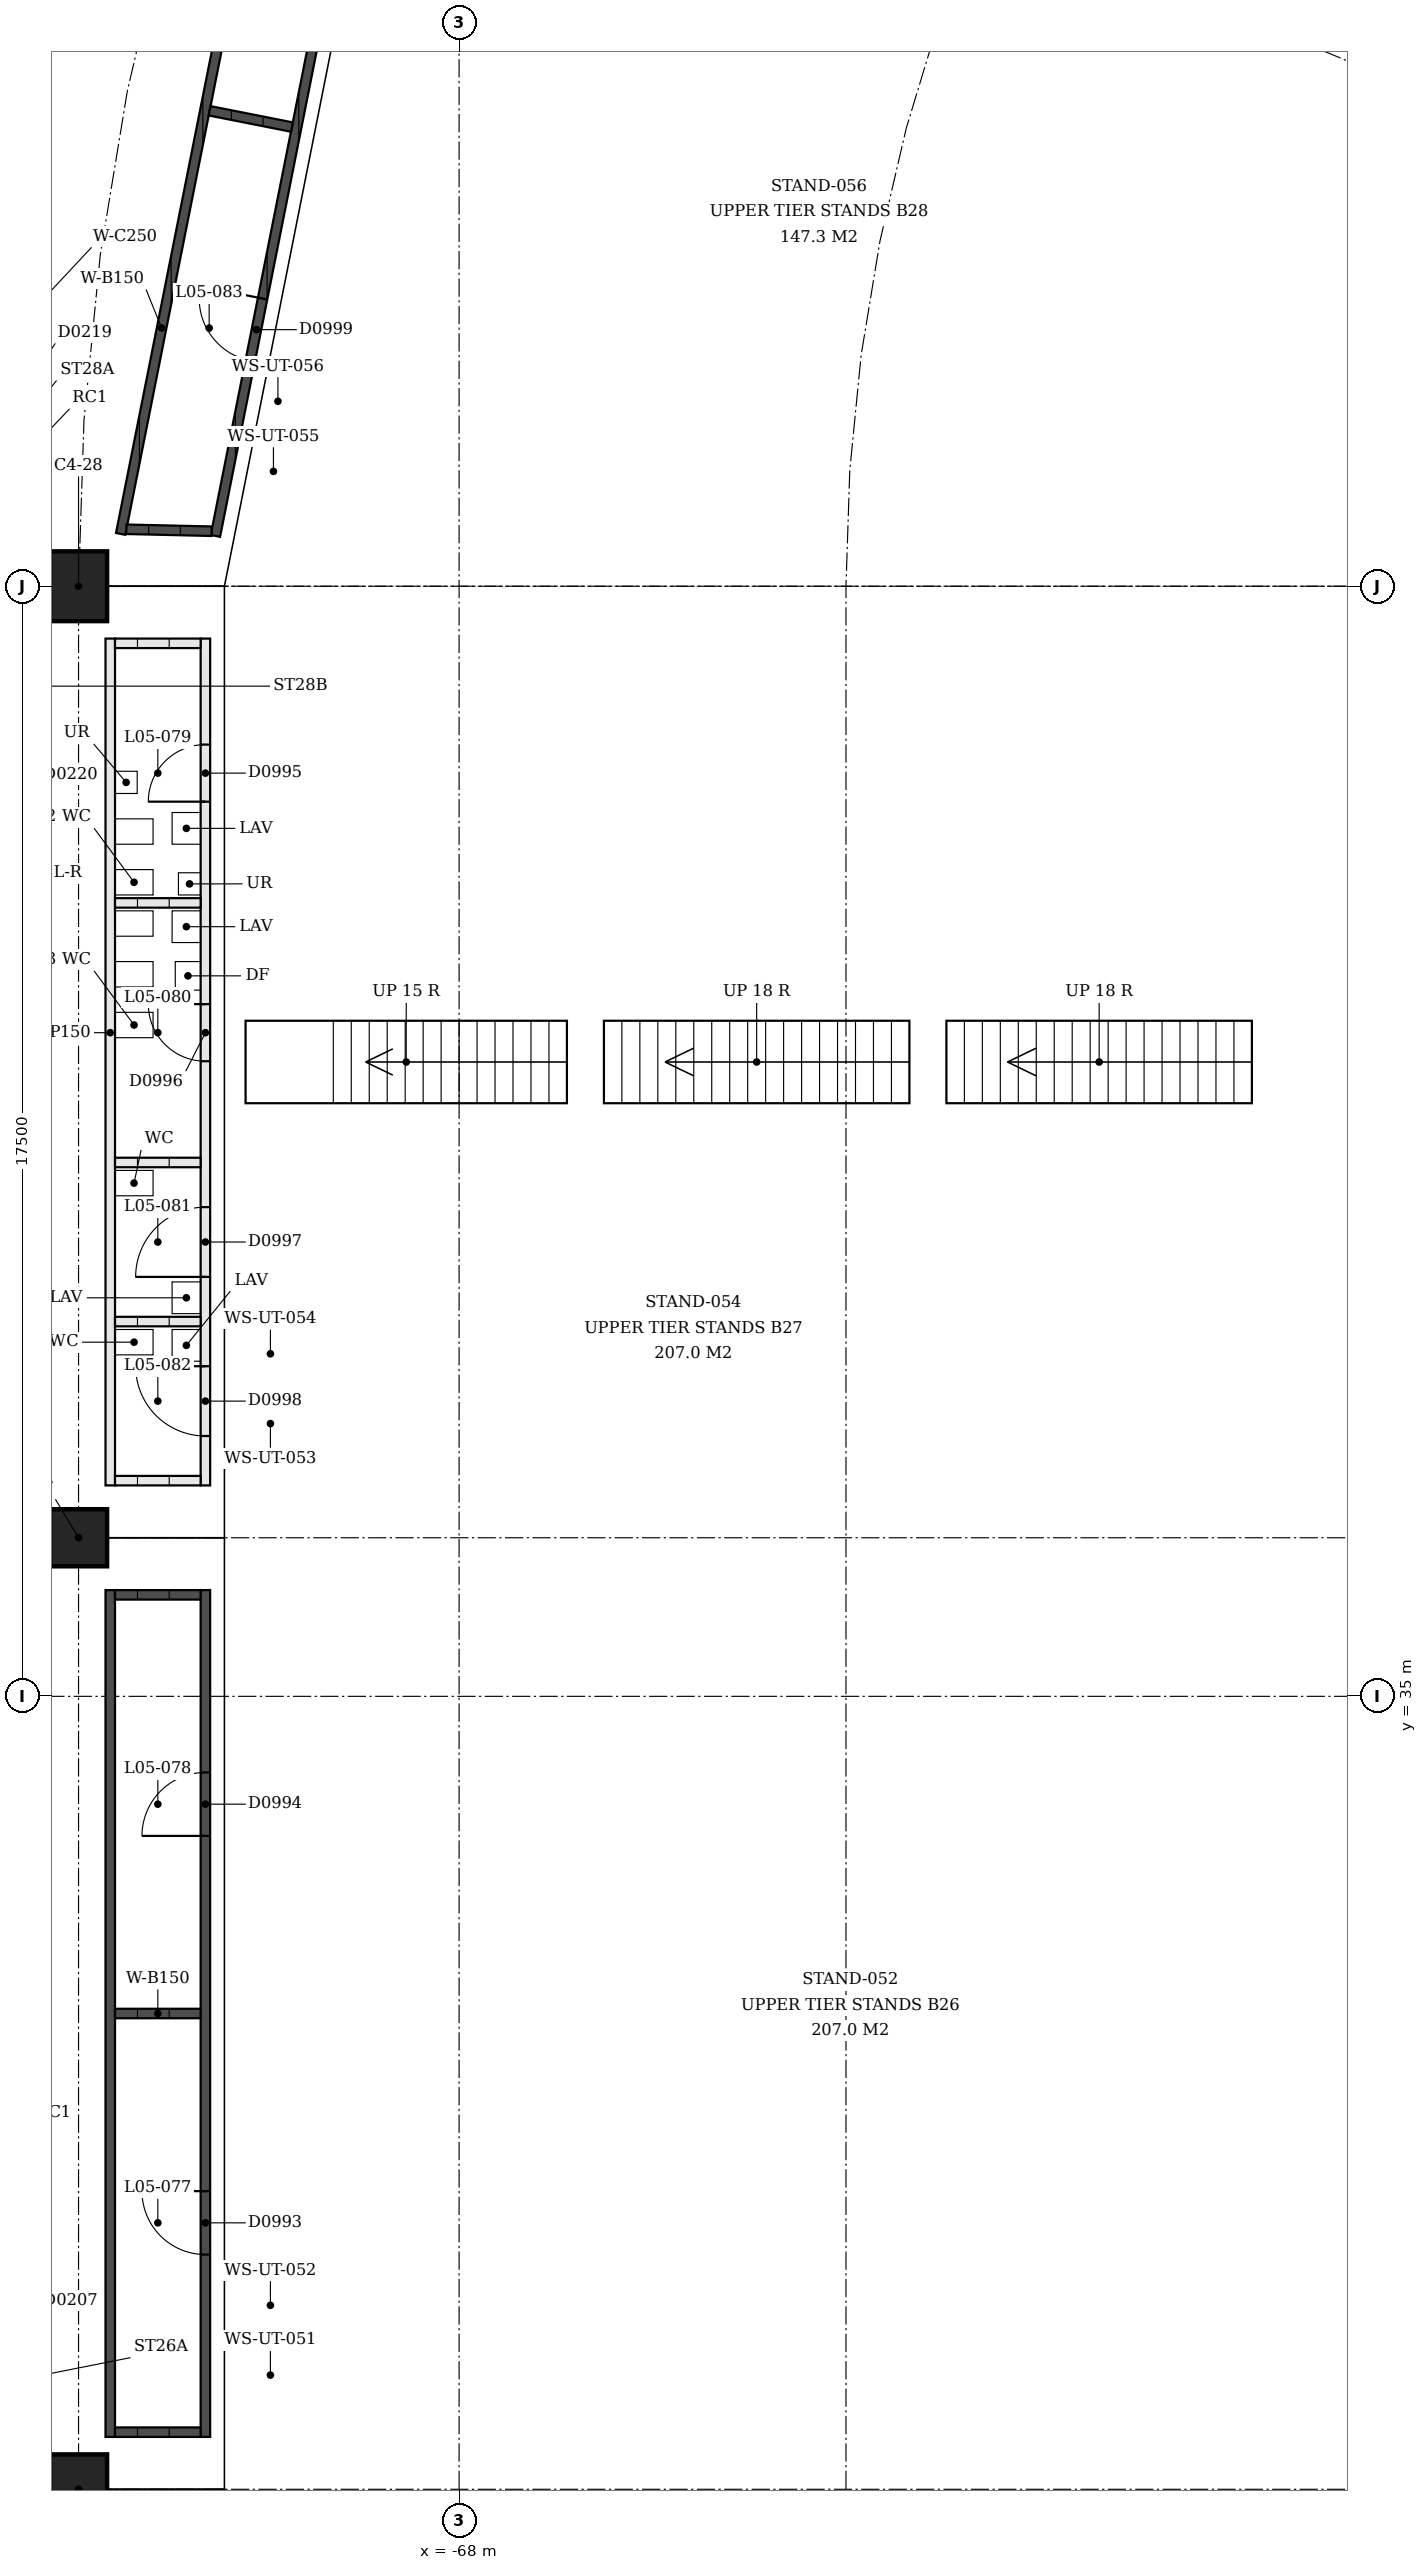
"""IFC4 building model, lengths in metres.
Left out: names, types, materials, properties, quantities, classifications, styles, units other than length and angle.
Written with IfcOpenShell. Run it as: python <this file> out.ifc"""

import sys

from ifc_helpers import new_model, si_unit, direction, frame, frame_2d, origin, origin_2d, place, context, subcontext, project, spatial, rectangle, extrude, element, fill, save


model = new_model("IFC4")
c1 = context("Model", 3, precision=1e-05, world=origin(), true_north=direction((0.0, 1.0)))
c2 = subcontext(c1, "Body", "Model", "MODEL_VIEW")
j1 = project(units=[si_unit("LENGTHUNIT", "METRE"), si_unit("PLANEANGLEUNIT", "RADIAN")], contexts=[c1])
p1 = place(None, origin())
s1 = spatial("IfcSite", under=j1, at=p1, CompositionType="ELEMENT")
p2 = place(p1, origin())
s2 = spatial("IfcBuilding", under=s1, at=p2, CompositionType="ELEMENT")
p3 = place(p2, frame((0.0, 0.0, 22.5)))
s3 = spatial("IfcBuildingStorey", under=s2, at=p3, CompositionType="ELEMENT", Elevation=22.5)
p4 = place(p3, frame((-74.0, 22.5, 0.0), z_axis=(0.0, 0.0, 1.0), x_axis=(0.0, -1.0, 0.0)))
e1 = element("IfcColumn", 1, at=p4, inside=s3, PredefinedType="COLUMN", context=c2, shape_type="SweptSolid", body=[
    extrude(rectangle(XDim=1.1, YDim=0.9, at=origin_2d()), origin(), (0.0, 0.0, 1.0), 6.5),
])
p5 = place(p3, frame((-74.0, 37.5, 0.0), z_axis=(0.0, 0.0, 1.0), x_axis=(0.0, -1.0, 0.0)))
e2 = element("IfcColumn", 2, at=p5, inside=s3, PredefinedType="COLUMN", context=c2, shape_type="SweptSolid", body=[
    extrude(rectangle(XDim=0.9, YDim=0.9, at=origin_2d()), origin(), (0.0, 0.0, 1.0), 6.5),
])
p6 = place(p3, frame((-74.0, 52.5, 0.0), z_axis=(0.0, 0.0, 1.0), x_axis=(0.0, -1.0, 0.0)))
e3 = element("IfcColumn", 3, at=p6, inside=s3, PredefinedType="COLUMN", context=c2, shape_type="SweptSolid", body=[
    extrude(rectangle(XDim=1.1, YDim=0.9, at=origin_2d()), origin(), (0.0, 0.0, 1.0), 6.5),
])
p7 = place(p3, frame((-72.0, 23.325, 0.0), z_axis=(0.0, 0.0, 1.0), x_axis=(0.0, 1.0, 0.0)))
e4 = element("IfcWall", 4, at=p7, inside=s3, PredefinedType="SOLIDWALL", context=c2, shape_type="SweptSolid", body=[
    extrude(rectangle(XDim=13.35, YDim=0.15, at=frame_2d((6.675, 0.0))), origin(), (0.0, 0.0, 1.0), 3.0),
])
p8 = place(p7, frame((2.875, 0.0, 0.0)))
e5 = element("IfcOpeningElement", 5, at=p8, cuts=e4, PredefinedType="OPENING", context=c2, shape_type="SweptSolid", body=[
    extrude(rectangle(XDim=1.0, YDim=2.1, at=frame_2d((0.5, 1.05))), frame((0.0, 0.075, 0.0), z_axis=(0.0, -1.0, 0.0), x_axis=(1.0, 0.0, 0.0)), (0.0, 0.0, 1.0), 0.15),
])
p9 = place(p7, frame((9.475, 0.0, 0.0)))
e6 = element("IfcOpeningElement", 6, at=p9, cuts=e4, PredefinedType="OPENING", context=c2, shape_type="SweptSolid", body=[
    extrude(rectangle(XDim=1.0, YDim=2.1, at=frame_2d((0.5, 1.05))), frame((0.0, 0.075, 0.0), z_axis=(0.0, -1.0, 0.0), x_axis=(1.0, 0.0, 0.0)), (0.0, 0.0, 1.0), 0.15),
])
p10 = place(p3, frame((-73.5, 23.325, 0.0), z_axis=(0.0, 0.0, 1.0), x_axis=(0.0, 1.0, 0.0)))
e7 = element("IfcWall", 7, at=p10, inside=s3, PredefinedType="SOLIDWALL", context=c2, shape_type="SweptSolid", body=[
    extrude(rectangle(XDim=13.35, YDim=0.15, at=frame_2d((6.675, 0.0))), origin(), (0.0, 0.0, 1.0), 3.0),
])
for number, where, z_axis, x_axis in (
    (8, (-72.075, 23.4, 0.0), (0.0, 0.0, 1.0), (-1.0, 0.0, 0.0)),
    (9, (-72.075, 30.0, 0.0), (0.0, 0.0, 1.0), (-1.0, 0.0, 0.0)),
    (10, (-72.075, 36.6, 0.0), (0.0, 0.0, 1.0), (-1.0, 0.0, 0.0)),
):
    element("IfcWall", number, at=place(p3, frame(where, z_axis=z_axis, x_axis=x_axis)), inside=s3, PredefinedType="SOLIDWALL", context=c2, shape_type="SweptSolid", body=[
        extrude(rectangle(XDim=1.35, YDim=0.15, at=frame_2d((0.675, 0.0))), origin(), (0.0, 0.0, 1.0), 3.0),
    ])
p11 = place(p3, frame((-72.0, 51.675, 0.0), z_axis=(0.0, 0.0, 1.0), x_axis=(0.0, -1.0, 0.0)))
e11 = element("IfcWall", 11, at=p11, inside=s3, PredefinedType="PARTITIONING", context=c2, shape_type="SweptSolid", body=[
    extrude(rectangle(XDim=13.35, YDim=0.15, at=frame_2d((6.675, 0.0))), origin(), (0.0, 0.0, 1.0), 3.0),
])
p12 = place(p11, frame((1.671, 0.0, 0.0)))
e12 = element("IfcOpeningElement", 12, at=p12, cuts=e11, PredefinedType="OPENING", context=c2, shape_type="SweptSolid", body=[
    extrude(rectangle(XDim=0.9, YDim=2.1, at=frame_2d((0.45, 1.05))), frame((0.0, 0.075, 0.0), z_axis=(0.0, -1.0, 0.0), x_axis=(1.0, 0.0, 0.0)), (0.0, 0.0, 1.0), 0.15),
])
p13 = place(p11, frame((5.763, 0.0, 0.0)))
e13 = element("IfcOpeningElement", 13, at=p13, cuts=e11, PredefinedType="OPENING", context=c2, shape_type="SweptSolid", body=[
    extrude(rectangle(XDim=0.9, YDim=2.1, at=frame_2d((0.45, 1.05))), frame((0.0, 0.075, 0.0), z_axis=(0.0, -1.0, 0.0), x_axis=(1.0, 0.0, 0.0)), (0.0, 0.0, 1.0), 0.15),
])
p14 = place(p11, frame((8.963, 0.0, 0.0)))
e14 = element("IfcOpeningElement", 14, at=p14, cuts=e11, PredefinedType="OPENING", context=c2, shape_type="SweptSolid", body=[
    extrude(rectangle(XDim=1.1, YDim=2.1, at=frame_2d((0.55, 1.05))), frame((0.0, 0.075, 0.0), z_axis=(0.0, -1.0, 0.0), x_axis=(1.0, 0.0, 0.0)), (0.0, 0.0, 1.0), 0.15),
])
p15 = place(p11, frame((11.471, 0.0, 0.0)))
e15 = element("IfcOpeningElement", 15, at=p15, cuts=e11, PredefinedType="OPENING", context=c2, shape_type="SweptSolid", body=[
    extrude(rectangle(XDim=1.1, YDim=2.1, at=frame_2d((0.55, 1.05))), frame((0.0, 0.075, 0.0), z_axis=(0.0, -1.0, 0.0), x_axis=(1.0, 0.0, 0.0)), (0.0, 0.0, 1.0), 0.15),
])
p16 = place(p3, frame((-73.5, 51.675, 0.0), z_axis=(0.0, 0.0, 1.0), x_axis=(0.0, -1.0, 0.0)))
e16 = element("IfcWall", 16, at=p16, inside=s3, PredefinedType="PARTITIONING", context=c2, shape_type="SweptSolid", body=[
    extrude(rectangle(XDim=13.35, YDim=0.15, at=frame_2d((6.675, 0.0))), origin(), (0.0, 0.0, 1.0), 3.0),
])
for number, where, z_axis, x_axis in (
    (17, (-72.075, 51.6, 0.0), (0.0, 0.0, 1.0), (-1.0, 0.0, 0.0)),
    (18, (-72.075, 47.508, 0.0), (0.0, 0.0, 1.0), (-1.0, 0.0, 0.0)),
    (19, (-72.075, 43.416, 0.0), (0.0, 0.0, 1.0), (-1.0, 0.0, 0.0)),
    (20, (-72.075, 40.908, 0.0), (0.0, 0.0, 1.0), (-1.0, 0.0, 0.0)),
    (21, (-72.075, 38.4, 0.0), (0.0, 0.0, 1.0), (-1.0, 0.0, 0.0)),
):
    element("IfcWall", number, at=place(p3, frame(where, z_axis=z_axis, x_axis=x_axis)), inside=s3, PredefinedType="PARTITIONING", context=c2, shape_type="SweptSolid", body=[
        extrude(rectangle(XDim=1.35, YDim=0.15, at=frame_2d((0.675, 0.0))), origin(), (0.0, 0.0, 1.0), 3.0),
    ])
p17 = place(p3, frame((-71.842, 53.293, 0.0), z_axis=(0.0, 0.0, 1.0), x_axis=(0.195095631841, 0.980784224198, 0.0)))
e22 = element("IfcWall", 22, at=p17, inside=s3, PredefinedType="SOLIDWALL", context=c2, shape_type="SweptSolid", body=[
    extrude(rectangle(XDim=13.113, YDim=0.15, at=frame_2d((6.557, 0.0))), origin(), (0.0, 0.0, 1.0), 3.0),
])
p18 = place(p17, frame((2.815, 0.0, 0.0)))
e23 = element("IfcOpeningElement", 23, at=p18, cuts=e22, PredefinedType="OPENING", context=c2, shape_type="SweptSolid", body=[
    extrude(rectangle(XDim=1.0, YDim=2.1, at=frame_2d((0.5, 1.05))), frame((0.0, 0.075, 0.0), z_axis=(0.0, -1.0, 0.0), x_axis=(1.0, 0.0, 0.0)), (0.0, 0.0, 1.0), 0.15),
])
p19 = place(p17, frame((9.298, 0.0, 0.0)))
e24 = element("IfcOpeningElement", 24, at=p19, cuts=e22, PredefinedType="OPENING", context=c2, shape_type="SweptSolid", body=[
    extrude(rectangle(XDim=1.0, YDim=2.1, at=frame_2d((0.5, 1.05))), frame((0.0, 0.075, 0.0), z_axis=(0.0, -1.0, 0.0), x_axis=(1.0, 0.0, 0.0)), (0.0, 0.0, 1.0), 0.15),
])
p20 = place(p3, frame((-73.336, 53.325, 0.0), z_axis=(0.0, 0.0, 1.0), x_axis=(0.195086146928, 0.980786110871, 0.0)))
e25 = element("IfcWall", 25, at=p20, inside=s3, PredefinedType="SOLIDWALL", context=c2, shape_type="SweptSolid", body=[
    extrude(rectangle(XDim=13.631, YDim=0.15, at=frame_2d((6.815, 0.0))), origin(), (0.0, 0.0, 1.0), 3.0),
])
p21 = place(p3, frame((-71.903, 53.367, 0.0), z_axis=(0.0, 0.0, 1.0), x_axis=(-0.999738070999, 0.022886445666, 0.0)))
e26 = element("IfcWall", 26, at=p21, inside=s3, PredefinedType="SOLIDWALL", context=c2, shape_type="SweptSolid", body=[
    extrude(rectangle(XDim=1.344, YDim=0.15, at=frame_2d((0.672, 0.0))), origin(), (0.0, 0.0, 1.0), 3.0),
])
p22 = place(p3, frame((-70.635, 59.738, 0.0), z_axis=(0.0, 0.0, 1.0), x_axis=(-0.981038980953, 0.193810520485, 0.0)))
e27 = element("IfcWall", 27, at=p22, inside=s3, PredefinedType="SOLIDWALL", context=c2, shape_type="SweptSolid", body=[
    extrude(rectangle(XDim=1.324, YDim=0.15, at=frame_2d((0.662, 0.0))), origin(), (0.0, 0.0, 1.0), 3.0),
])
p23 = place(p8, origin())
e28 = element("IfcDoor", 28, at=p23, inside=s3, OperationType="SINGLE_SWING_LEFT", PredefinedType="DOOR", context=c2, shape_type="SweptSolid", body=[
    extrude(rectangle(XDim=1.0, YDim=2.1, at=frame_2d((0.5, 1.05))), frame((0.0, 0.025, 0.0), z_axis=(0.0, -1.0, 0.0), x_axis=(1.0, 0.0, 0.0)), (0.0, 0.0, 1.0), 0.05),
])
fill(e5, e28)
p24 = place(p9, origin())
e29 = element("IfcDoor", 29, at=p24, inside=s3, OperationType="SINGLE_SWING_RIGHT", PredefinedType="DOOR", context=c2, shape_type="SweptSolid", body=[
    extrude(rectangle(XDim=1.0, YDim=2.1, at=frame_2d((0.5, 1.05))), frame((0.0, 0.025, 0.0), z_axis=(0.0, -1.0, 0.0), x_axis=(1.0, 0.0, 0.0)), (0.0, 0.0, 1.0), 0.05),
])
fill(e6, e29)
p25 = place(p12, origin())
e30 = element("IfcDoor", 30, at=p25, inside=s3, OperationType="SINGLE_SWING_RIGHT", PredefinedType="DOOR", context=c2, shape_type="SweptSolid", body=[
    extrude(rectangle(XDim=0.9, YDim=2.1, at=frame_2d((0.45, 1.05))), frame((0.0, 0.025, 0.0), z_axis=(0.0, -1.0, 0.0), x_axis=(1.0, 0.0, 0.0)), (0.0, 0.0, 1.0), 0.05),
])
fill(e12, e30)
p26 = place(p13, origin())
e31 = element("IfcDoor", 31, at=p26, inside=s3, OperationType="SINGLE_SWING_LEFT", PredefinedType="DOOR", context=c2, shape_type="SweptSolid", body=[
    extrude(rectangle(XDim=0.9, YDim=2.1, at=frame_2d((0.45, 1.05))), frame((0.0, 0.025, 0.0), z_axis=(0.0, -1.0, 0.0), x_axis=(1.0, 0.0, 0.0)), (0.0, 0.0, 1.0), 0.05),
])
fill(e13, e31)
p27 = place(p14, origin())
e32 = element("IfcDoor", 32, at=p27, inside=s3, OperationType="SINGLE_SWING_RIGHT", PredefinedType="DOOR", context=c2, shape_type="SweptSolid", body=[
    extrude(rectangle(XDim=1.1, YDim=2.1, at=frame_2d((0.55, 1.05))), frame((0.0, 0.025, 0.0), z_axis=(0.0, -1.0, 0.0), x_axis=(1.0, 0.0, 0.0)), (0.0, 0.0, 1.0), 0.05),
])
fill(e14, e32)
p28 = place(p15, origin())
e33 = element("IfcDoor", 33, at=p28, inside=s3, OperationType="SINGLE_SWING_LEFT", PredefinedType="DOOR", context=c2, shape_type="SweptSolid", body=[
    extrude(rectangle(XDim=1.1, YDim=2.1, at=frame_2d((0.55, 1.05))), frame((0.0, 0.025, 0.0), z_axis=(0.0, -1.0, 0.0), x_axis=(1.0, 0.0, 0.0)), (0.0, 0.0, 1.0), 0.05),
])
fill(e15, e33)
p29 = place(p18, origin())
e34 = element("IfcDoor", 34, at=p29, inside=s3, OperationType="SINGLE_SWING_LEFT", PredefinedType="DOOR", context=c2, shape_type="SweptSolid", body=[
    extrude(rectangle(XDim=1.0, YDim=2.1, at=frame_2d((0.5, 1.05))), frame((0.0, 0.025, 0.0), z_axis=(0.0, -1.0, 0.0), x_axis=(1.0, 0.0, 0.0)), (0.0, 0.0, 1.0), 0.05),
])
fill(e23, e34)
save(model, sys.argv[1])
